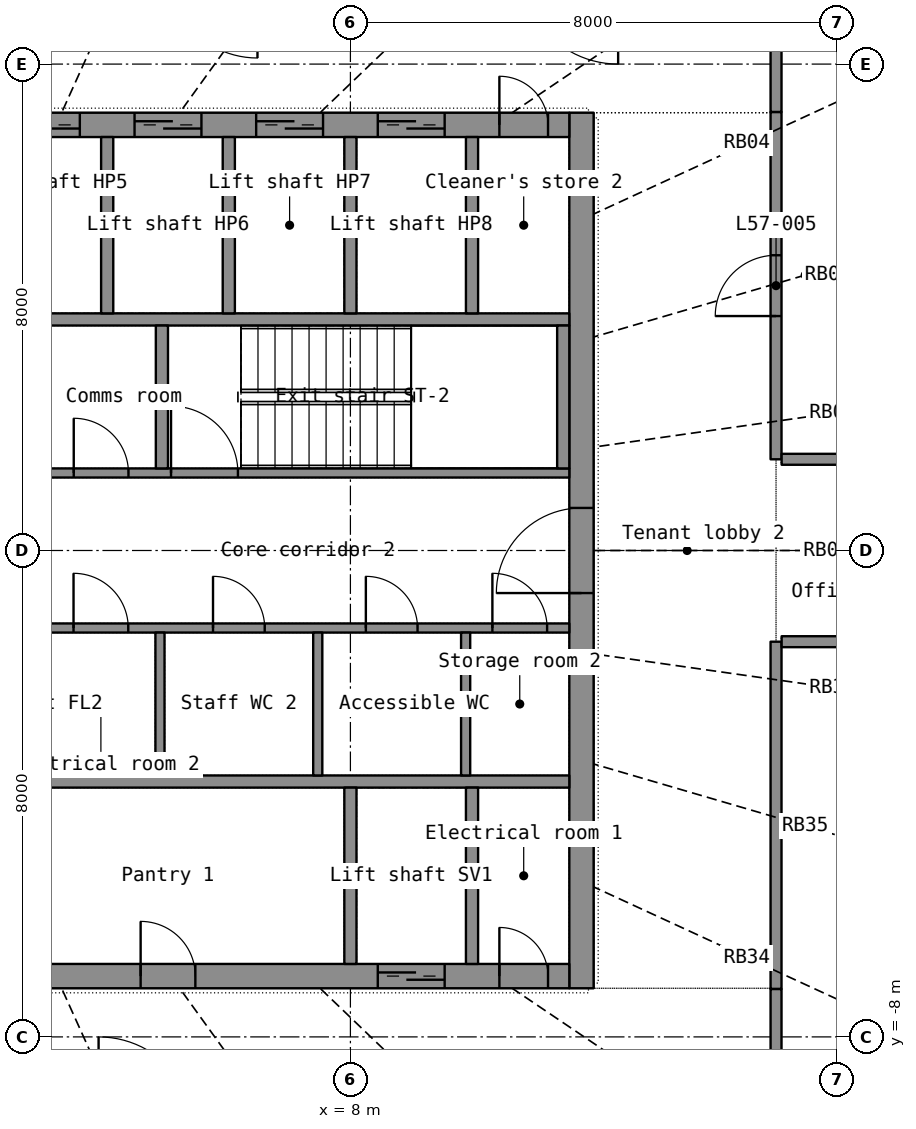
"""IFC4 building model, lengths in metres.
Left out: names, types, materials, properties, quantities, classifications, styles, units other than length and angle.
Written with IfcOpenShell. Run it as: python <this file> out.ifc"""

import sys

from ifc_helpers import new_model, si_unit, direction, frame, frame_2d, origin, place, context, subcontext, project, spatial, rectangle, extrude, element, fill, save


model = new_model("IFC4")
c1 = context("Model", 3, precision=1e-05, world=origin(), true_north=direction((0.0, 1.0)))
c2 = subcontext(c1, "Body", "Model", "MODEL_VIEW")
j1 = project(units=[si_unit("LENGTHUNIT", "METRE"), si_unit("PLANEANGLEUNIT", "RADIAN")], contexts=[c1])
p1 = place(None, origin())
s1 = spatial("IfcSite", under=j1, at=p1, CompositionType="ELEMENT")
p2 = place(p1, origin())
s2 = spatial("IfcBuilding", under=s1, at=p2, CompositionType="ELEMENT")
p3 = place(p2, frame((0.0, 0.0, 235.6)))
s3 = spatial("IfcBuildingStorey", under=s2, at=p3, CompositionType="ELEMENT", Elevation=235.6)
p4 = place(p3, frame((11.8, -7.2, 0.0), z_axis=(0.0, 0.0, 1.0), x_axis=(0.0, 1.0, 0.0)))
e1 = element("IfcWall", 1, at=p4, inside=s3, PredefinedType="SHEAR", context=c2, shape_type="SweptSolid", body=[
    extrude(rectangle(XDim=14.4, YDim=0.4, at=frame_2d((7.2, 0.0))), origin(), (0.0, 0.0, 1.0), 3.3),
])
p5 = place(p4, frame((6.5, 0.0, 0.0)))
e2 = element("IfcOpeningElement", 2, at=p5, cuts=e1, PredefinedType="OPENING", context=c2, shape_type="SweptSolid", body=[
    extrude(rectangle(XDim=1.4, YDim=2.2, at=frame_2d((0.7, 1.1))), frame((0.0, 0.21, 0.0), z_axis=(0.0, -1.0, 0.0), x_axis=(1.0, 0.0, 0.0)), (0.0, 0.0, 1.0), 0.42),
])
p6 = place(p3, frame((-11.6, -7.0, 0.0), z_axis=(0.0, 0.0, 1.0), x_axis=(1.0, 0.0, 0.0)))
e3 = element("IfcWall", 3, at=p6, inside=s3, PredefinedType="SHEAR", context=c2, shape_type="SweptSolid", body=[
    extrude(rectangle(XDim=23.2, YDim=0.4, at=frame_2d((11.6, 0.0))), origin(), (0.0, 0.0, 1.0), 3.3),
])
p7 = place(p6, frame((20.05, 0.0, 0.0)))
e4 = element("IfcOpeningElement", 4, at=p7, cuts=e3, PredefinedType="OPENING", context=c2, shape_type="SweptSolid", body=[
    extrude(rectangle(XDim=1.1, YDim=2.2, at=frame_2d((0.55, 1.1))), frame((0.0, 0.21, 0.0), z_axis=(0.0, -1.0, 0.0), x_axis=(1.0, 0.0, 0.0)), (0.0, 0.0, 1.0), 0.42),
])
p8 = place(p6, frame((3.15, 0.0, 0.0)))
e5 = element("IfcOpeningElement", 5, at=p8, cuts=e3, PredefinedType="OPENING", context=c2, shape_type="SweptSolid", body=[
    extrude(rectangle(XDim=0.9, YDim=2.1, at=frame_2d((0.45, 1.05))), frame((0.0, 0.21, 0.0), z_axis=(0.0, -1.0, 0.0), x_axis=(1.0, 0.0, 0.0)), (0.0, 0.0, 1.0), 0.42),
])
p9 = place(p6, frame((7.15, 0.0, 0.0)))
e6 = element("IfcOpeningElement", 6, at=p9, cuts=e3, PredefinedType="OPENING", context=c2, shape_type="SweptSolid", body=[
    extrude(rectangle(XDim=0.9, YDim=2.1, at=frame_2d((0.45, 1.05))), frame((0.0, 0.21, 0.0), z_axis=(0.0, -1.0, 0.0), x_axis=(1.0, 0.0, 0.0)), (0.0, 0.0, 1.0), 0.42),
])
p10 = place(p6, frame((11.15, 0.0, 0.0)))
e7 = element("IfcOpeningElement", 7, at=p10, cuts=e3, PredefinedType="OPENING", context=c2, shape_type="SweptSolid", body=[
    extrude(rectangle(XDim=0.9, YDim=2.1, at=frame_2d((0.45, 1.05))), frame((0.0, 0.21, 0.0), z_axis=(0.0, -1.0, 0.0), x_axis=(1.0, 0.0, 0.0)), (0.0, 0.0, 1.0), 0.42),
])
p11 = place(p6, frame((16.15, 0.0, 0.0)))
e8 = element("IfcOpeningElement", 8, at=p11, cuts=e3, PredefinedType="OPENING", context=c2, shape_type="SweptSolid", body=[
    extrude(rectangle(XDim=0.9, YDim=2.1, at=frame_2d((0.45, 1.05))), frame((0.0, 0.21, 0.0), z_axis=(0.0, -1.0, 0.0), x_axis=(1.0, 0.0, 0.0)), (0.0, 0.0, 1.0), 0.42),
])
p12 = place(p6, frame((0.35, 0.0, 0.0)))
e9 = element("IfcOpeningElement", 9, at=p12, cuts=e3, PredefinedType="OPENING", context=c2, shape_type="SweptSolid", body=[
    extrude(rectangle(XDim=0.8, YDim=2.05, at=frame_2d((0.4, 1.025))), frame((0.0, 0.21, 0.0), z_axis=(0.0, -1.0, 0.0), x_axis=(1.0, 0.0, 0.0)), (0.0, 0.0, 1.0), 0.42),
])
p13 = place(p6, frame((22.05, 0.0, 0.0)))
e10 = element("IfcOpeningElement", 10, at=p13, cuts=e3, PredefinedType="OPENING", context=c2, shape_type="SweptSolid", body=[
    extrude(rectangle(XDim=0.8, YDim=2.05, at=frame_2d((0.4, 1.025))), frame((0.0, 0.21, 0.0), z_axis=(0.0, -1.0, 0.0), x_axis=(1.0, 0.0, 0.0)), (0.0, 0.0, 1.0), 0.42),
])
p14 = place(p3, frame((-11.6, 7.0, 0.0), z_axis=(0.0, 0.0, 1.0), x_axis=(1.0, 0.0, 0.0)))
e11 = element("IfcWall", 11, at=p14, inside=s3, PredefinedType="SHEAR", context=c2, shape_type="SweptSolid", body=[
    extrude(rectangle(XDim=23.2, YDim=0.4, at=frame_2d((11.6, 0.0))), origin(), (0.0, 0.0, 1.0), 3.3),
])
p15 = place(p14, frame((2.05, 0.0, 0.0)))
e12 = element("IfcOpeningElement", 12, at=p15, cuts=e11, PredefinedType="OPENING", context=c2, shape_type="SweptSolid", body=[
    extrude(rectangle(XDim=1.1, YDim=2.2, at=frame_2d((0.55, 1.1))), frame((0.0, 0.21, 0.0), z_axis=(0.0, -1.0, 0.0), x_axis=(1.0, 0.0, 0.0)), (0.0, 0.0, 1.0), 0.42),
])
p16 = place(p14, frame((6.05, 0.0, 0.0)))
e13 = element("IfcOpeningElement", 13, at=p16, cuts=e11, PredefinedType="OPENING", context=c2, shape_type="SweptSolid", body=[
    extrude(rectangle(XDim=1.1, YDim=2.2, at=frame_2d((0.55, 1.1))), frame((0.0, 0.21, 0.0), z_axis=(0.0, -1.0, 0.0), x_axis=(1.0, 0.0, 0.0)), (0.0, 0.0, 1.0), 0.42),
])
p17 = place(p14, frame((8.05, 0.0, 0.0)))
e14 = element("IfcOpeningElement", 14, at=p17, cuts=e11, PredefinedType="OPENING", context=c2, shape_type="SweptSolid", body=[
    extrude(rectangle(XDim=1.1, YDim=2.2, at=frame_2d((0.55, 1.1))), frame((0.0, 0.21, 0.0), z_axis=(0.0, -1.0, 0.0), x_axis=(1.0, 0.0, 0.0)), (0.0, 0.0, 1.0), 0.42),
])
p18 = place(p14, frame((10.05, 0.0, 0.0)))
e15 = element("IfcOpeningElement", 15, at=p18, cuts=e11, PredefinedType="OPENING", context=c2, shape_type="SweptSolid", body=[
    extrude(rectangle(XDim=1.1, YDim=2.2, at=frame_2d((0.55, 1.1))), frame((0.0, 0.21, 0.0), z_axis=(0.0, -1.0, 0.0), x_axis=(1.0, 0.0, 0.0)), (0.0, 0.0, 1.0), 0.42),
])
p19 = place(p14, frame((12.05, 0.0, 0.0)))
e16 = element("IfcOpeningElement", 16, at=p19, cuts=e11, PredefinedType="OPENING", context=c2, shape_type="SweptSolid", body=[
    extrude(rectangle(XDim=1.1, YDim=2.2, at=frame_2d((0.55, 1.1))), frame((0.0, 0.21, 0.0), z_axis=(0.0, -1.0, 0.0), x_axis=(1.0, 0.0, 0.0)), (0.0, 0.0, 1.0), 0.42),
])
p20 = place(p14, frame((14.05, 0.0, 0.0)))
e17 = element("IfcOpeningElement", 17, at=p20, cuts=e11, PredefinedType="OPENING", context=c2, shape_type="SweptSolid", body=[
    extrude(rectangle(XDim=1.1, YDim=2.2, at=frame_2d((0.55, 1.1))), frame((0.0, 0.21, 0.0), z_axis=(0.0, -1.0, 0.0), x_axis=(1.0, 0.0, 0.0)), (0.0, 0.0, 1.0), 0.42),
])
p21 = place(p14, frame((16.05, 0.0, 0.0)))
e18 = element("IfcOpeningElement", 18, at=p21, cuts=e11, PredefinedType="OPENING", context=c2, shape_type="SweptSolid", body=[
    extrude(rectangle(XDim=1.1, YDim=2.2, at=frame_2d((0.55, 1.1))), frame((0.0, 0.21, 0.0), z_axis=(0.0, -1.0, 0.0), x_axis=(1.0, 0.0, 0.0)), (0.0, 0.0, 1.0), 0.42),
])
p22 = place(p14, frame((18.05, 0.0, 0.0)))
e19 = element("IfcOpeningElement", 19, at=p22, cuts=e11, PredefinedType="OPENING", context=c2, shape_type="SweptSolid", body=[
    extrude(rectangle(XDim=1.1, YDim=2.2, at=frame_2d((0.55, 1.1))), frame((0.0, 0.21, 0.0), z_axis=(0.0, -1.0, 0.0), x_axis=(1.0, 0.0, 0.0)), (0.0, 0.0, 1.0), 0.42),
])
p23 = place(p14, frame((20.05, 0.0, 0.0)))
e20 = element("IfcOpeningElement", 20, at=p23, cuts=e11, PredefinedType="OPENING", context=c2, shape_type="SweptSolid", body=[
    extrude(rectangle(XDim=1.1, YDim=2.2, at=frame_2d((0.55, 1.1))), frame((0.0, 0.21, 0.0), z_axis=(0.0, -1.0, 0.0), x_axis=(1.0, 0.0, 0.0)), (0.0, 0.0, 1.0), 0.42),
])
p24 = place(p14, frame((4.15, 0.0, 0.0)))
e21 = element("IfcOpeningElement", 21, at=p24, cuts=e11, PredefinedType="OPENING", context=c2, shape_type="SweptSolid", body=[
    extrude(rectangle(XDim=0.9, YDim=2.1, at=frame_2d((0.45, 1.05))), frame((0.0, 0.21, 0.0), z_axis=(0.0, -1.0, 0.0), x_axis=(1.0, 0.0, 0.0)), (0.0, 0.0, 1.0), 0.42),
])
p25 = place(p14, frame((0.35, 0.0, 0.0)))
e22 = element("IfcOpeningElement", 22, at=p25, cuts=e11, PredefinedType="OPENING", context=c2, shape_type="SweptSolid", body=[
    extrude(rectangle(XDim=0.8, YDim=2.05, at=frame_2d((0.4, 1.025))), frame((0.0, 0.21, 0.0), z_axis=(0.0, -1.0, 0.0), x_axis=(1.0, 0.0, 0.0)), (0.0, 0.0, 1.0), 0.42),
])
p26 = place(p14, frame((22.05, 0.0, 0.0)))
e23 = element("IfcOpeningElement", 23, at=p26, cuts=e11, PredefinedType="OPENING", context=c2, shape_type="SweptSolid", body=[
    extrude(rectangle(XDim=0.8, YDim=2.05, at=frame_2d((0.4, 1.025))), frame((0.0, 0.21, 0.0), z_axis=(0.0, -1.0, 0.0), x_axis=(1.0, 0.0, 0.0)), (0.0, 0.0, 1.0), 0.42),
])
for number, where, z_axis, x_axis in (
    (24, (-11.6, -3.8, 0.0), (0.0, 0.0, 1.0), (1.0, 0.0, 0.0)),
    (25, (-11.6, 3.8, 0.0), (0.0, 0.0, 1.0), (1.0, 0.0, 0.0)),
):
    element("IfcWall", number, at=place(p3, frame(where, z_axis=z_axis, x_axis=x_axis)), inside=s3, PredefinedType="SHEAR", context=c2, shape_type="SweptSolid", body=[
        extrude(rectangle(XDim=23.2, YDim=0.2, at=frame_2d((11.6, 0.0))), origin(), (0.0, 0.0, 1.0), 3.3),
    ])
for number, where, z_axis, x_axis in (
    (26, (8.0, -6.8, 0.0), (0.0, 0.0, 1.0), (0.0, 1.0, 0.0)),
    (27, (10.0, -6.8, 0.0), (0.0, 0.0, 1.0), (0.0, 1.0, 0.0)),
    (28, (4.0, 3.9, 0.0), (0.0, 0.0, 1.0), (0.0, 1.0, 0.0)),
    (29, (6.0, 3.9, 0.0), (0.0, 0.0, 1.0), (0.0, 1.0, 0.0)),
    (30, (8.0, 3.9, 0.0), (0.0, 0.0, 1.0), (0.0, 1.0, 0.0)),
    (31, (10.0, 3.9, 0.0), (0.0, 0.0, 1.0), (0.0, 1.0, 0.0)),
):
    element("IfcWall", number, at=place(p3, frame(where, z_axis=z_axis, x_axis=x_axis)), inside=s3, PredefinedType="SHEAR", context=c2, shape_type="SweptSolid", body=[
        extrude(rectangle(XDim=2.9, YDim=0.2, at=frame_2d((1.45, 0.0))), origin(), (0.0, 0.0, 1.0), 3.3),
    ])
p27 = place(p3, frame((3.0, -1.275, 0.0), z_axis=(0.0, 0.0, 1.0), x_axis=(1.0, 0.0, 0.0)))
e32 = element("IfcWall", 32, at=p27, inside=s3, PredefinedType="PARTITIONING", context=c2, shape_type="SweptSolid", body=[
    extrude(rectangle(XDim=8.6, YDim=0.15, at=frame_2d((4.3, 0.0))), origin(), (0.0, 0.0, 1.0), 3.3),
])
p28 = place(p27, frame((0.447, 0.0, 0.0)))
e33 = element("IfcOpeningElement", 33, at=p28, cuts=e32, PredefinedType="OPENING", context=c2, shape_type="SweptSolid", body=[
    extrude(rectangle(XDim=0.9, YDim=2.1, at=frame_2d((0.45, 1.05))), frame((0.0, 0.085, 0.0), z_axis=(0.0, -1.0, 0.0), x_axis=(1.0, 0.0, 0.0)), (0.0, 0.0, 1.0), 0.17),
])
p29 = place(p27, frame((2.74, 0.0, 0.0)))
e34 = element("IfcOpeningElement", 34, at=p29, cuts=e32, PredefinedType="OPENING", context=c2, shape_type="SweptSolid", body=[
    extrude(rectangle(XDim=0.85, YDim=2.1, at=frame_2d((0.425, 1.05))), frame((0.0, 0.085, 0.0), z_axis=(0.0, -1.0, 0.0), x_axis=(1.0, 0.0, 0.0)), (0.0, 0.0, 1.0), 0.17),
])
p30 = place(p27, frame((5.254, 0.0, 0.0)))
e35 = element("IfcOpeningElement", 35, at=p30, cuts=e32, PredefinedType="OPENING", context=c2, shape_type="SweptSolid", body=[
    extrude(rectangle(XDim=0.85, YDim=2.1, at=frame_2d((0.425, 1.05))), frame((0.0, 0.085, 0.0), z_axis=(0.0, -1.0, 0.0), x_axis=(1.0, 0.0, 0.0)), (0.0, 0.0, 1.0), 0.17),
])
p31 = place(p27, frame((7.335, 0.0, 0.0)))
e36 = element("IfcOpeningElement", 36, at=p31, cuts=e32, PredefinedType="OPENING", context=c2, shape_type="SweptSolid", body=[
    extrude(rectangle(XDim=0.9, YDim=2.1, at=frame_2d((0.45, 1.05))), frame((0.0, 0.085, 0.0), z_axis=(0.0, -1.0, 0.0), x_axis=(1.0, 0.0, 0.0)), (0.0, 0.0, 1.0), 0.17),
])
p32 = place(p3, frame((3.0, 1.275, 0.0), z_axis=(0.0, 0.0, 1.0), x_axis=(1.0, 0.0, 0.0)))
e37 = element("IfcWall", 37, at=p32, inside=s3, PredefinedType="SHEAR", context=c2, shape_type="SweptSolid", body=[
    extrude(rectangle(XDim=8.6, YDim=0.15, at=frame_2d((4.3, 0.0))), origin(), (0.0, 0.0, 1.0), 3.3),
])
p33 = place(p32, frame((2.05, 0.0, 0.0)))
e38 = element("IfcOpeningElement", 38, at=p33, cuts=e37, PredefinedType="OPENING", context=c2, shape_type="SweptSolid", body=[
    extrude(rectangle(XDim=1.1, YDim=2.15, at=frame_2d((0.55, 1.075))), frame((0.0, 0.085, 0.0), z_axis=(0.0, -1.0, 0.0), x_axis=(1.0, 0.0, 0.0)), (0.0, 0.0, 1.0), 0.17),
])
p34 = place(p32, frame((0.45, 0.0, 0.0)))
e39 = element("IfcOpeningElement", 39, at=p34, cuts=e37, PredefinedType="OPENING", context=c2, shape_type="SweptSolid", body=[
    extrude(rectangle(XDim=0.9, YDim=2.1, at=frame_2d((0.45, 1.05))), frame((0.0, 0.085, 0.0), z_axis=(0.0, -1.0, 0.0), x_axis=(1.0, 0.0, 0.0)), (0.0, 0.0, 1.0), 0.17),
])
for number, where, z_axis, x_axis in (
    (40, (11.5, 1.35, 0.0), (0.0, 0.0, 1.0), (0.0, 1.0, 0.0)),
    (41, (4.9, 1.35, 0.0), (0.0, 0.0, 1.0), (0.0, 1.0, 0.0)),
):
    element("IfcWall", number, at=place(p3, frame(where, z_axis=z_axis, x_axis=x_axis)), inside=s3, PredefinedType="SHEAR", context=c2, shape_type="SweptSolid", body=[
        extrude(rectangle(XDim=2.35, YDim=0.2, at=frame_2d((1.175, 0.0))), origin(), (0.0, 0.0, 1.0), 3.3),
    ])
for number, where, z_axis, x_axis in (
    (42, (4.868, -3.7, 0.0), (0.0, 0.0, 1.0), (0.0, 1.0, 0.0)),
    (43, (7.463, -3.7, 0.0), (0.0, 0.0, 1.0), (0.0, 1.0, 0.0)),
    (44, (9.895, -3.7, 0.0), (0.0, 0.0, 1.0), (0.0, 1.0, 0.0)),
):
    element("IfcWall", number, at=place(p3, frame(where, z_axis=z_axis, x_axis=x_axis)), inside=s3, PredefinedType="PARTITIONING", context=c2, shape_type="SweptSolid", body=[
        extrude(rectangle(XDim=2.35, YDim=0.15, at=frame_2d((1.175, 0.0))), origin(), (0.0, 0.0, 1.0), 3.3),
    ])
p35 = place(p3, frame((15.0, -7.212, 0.0), z_axis=(0.0, 0.0, 1.0), x_axis=(0.0, 1.0, 0.0)))
e45 = element("IfcWall", 45, at=p35, inside=s3, PredefinedType="PARTITIONING", context=c2, shape_type="SweptSolid", body=[
    extrude(rectangle(XDim=5.712, YDim=0.18, at=frame_2d((2.856, 0.0))), origin(), (0.0, 0.0, 1.0), 2.4),
])
p36 = place(p3, frame((15.0, 1.5, 0.0), z_axis=(0.0, 0.0, 1.0), x_axis=(0.0, 1.0, 0.0)))
e46 = element("IfcWall", 46, at=p36, inside=s3, PredefinedType="PARTITIONING", context=c2, shape_type="SweptSolid", body=[
    extrude(rectangle(XDim=5.712, YDim=0.18, at=frame_2d((2.856, 0.0))), origin(), (0.0, 0.0, 1.0), 2.4),
])
p37 = place(p36, frame((2.356, 0.0, 0.0)))
e47 = element("IfcOpeningElement", 47, at=p37, cuts=e46, PredefinedType="OPENING", context=c2, shape_type="SweptSolid", body=[
    extrude(rectangle(XDim=1.0, YDim=2.1, at=frame_2d((0.5, 1.05))), frame((0.0, 0.1, 0.0), z_axis=(0.0, -1.0, 0.0), x_axis=(1.0, 0.0, 0.0)), (0.0, 0.0, 1.0), 0.2),
])
for number, where, z_axis, x_axis in (
    (48, (15.092, -1.5, 0.0), (0.0, 0.0, 1.0), (1.0, 0.0, 0.0)),
    (49, (18.722, 1.5, 0.0), (0.0, 0.0, 1.0), (-1.0, 0.0, 0.0)),
):
    element("IfcWall", number, at=place(p3, frame(where, z_axis=z_axis, x_axis=x_axis)), inside=s3, PredefinedType="PARTITIONING", context=c2, shape_type="SweptSolid", body=[
        extrude(rectangle(XDim=3.63, YDim=0.18, at=frame_2d((1.815, 0.0))), origin(), (0.0, 0.0, 1.0), 2.4),
    ])
p38 = place(p3, frame((15.0, -9.508, 0.0), z_axis=(0.0, 0.0, 1.0), x_axis=(0.0, 1.0, 0.0)))
e50 = element("IfcWall", 50, at=p38, inside=s3, PredefinedType="PARTITIONING", context=c2, shape_type="SweptSolid", body=[
    extrude(rectangle(XDim=2.295, YDim=0.18, at=frame_2d((1.147, 0.0))), origin(), (0.0, 0.0, 1.0), 2.4),
])
p39 = place(p3, frame((15.0, 7.213, 0.0), z_axis=(0.0, 0.0, 1.0), x_axis=(0.0, 1.0, 0.0)))
e51 = element("IfcWall", 51, at=p39, inside=s3, PredefinedType="PARTITIONING", context=c2, shape_type="SweptSolid", body=[
    extrude(rectangle(XDim=1.31, YDim=0.18, at=frame_2d((0.655, 0.0))), origin(), (0.0, 0.0, 1.0), 2.4),
])
p40 = place(p7, origin())
e52 = element("IfcDoor", 52, at=p40, inside=s3, OperationType="DOUBLE_DOOR_SLIDING", PredefinedType="DOOR", context=c2, shape_type="SweptSolid", body=[
    extrude(rectangle(XDim=1.1, YDim=2.2, at=frame_2d((0.55, 1.1))), frame((0.0, 0.025, 0.0), z_axis=(0.0, -1.0, 0.0), x_axis=(1.0, 0.0, 0.0)), (0.0, 0.0, 1.0), 0.05),
])
fill(e4, e52)
p41 = place(p11, origin())
e53 = element("IfcDoor", 53, at=p41, inside=s3, OperationType="SINGLE_SWING_LEFT", PredefinedType="DOOR", context=c2, shape_type="SweptSolid", body=[
    extrude(rectangle(XDim=0.9, YDim=2.1, at=frame_2d((0.45, 1.05))), frame((0.0, 0.025, 0.0), z_axis=(0.0, -1.0, 0.0), x_axis=(1.0, 0.0, 0.0)), (0.0, 0.0, 1.0), 0.05),
])
fill(e8, e53)
p42 = place(p13, origin())
e54 = element("IfcDoor", 54, at=p42, inside=s3, OperationType="SINGLE_SWING_LEFT", PredefinedType="DOOR", context=c2, shape_type="SweptSolid", body=[
    extrude(rectangle(XDim=0.8, YDim=2.05, at=frame_2d((0.4, 1.025))), frame((0.0, 0.025, 0.0), z_axis=(0.0, -1.0, 0.0), x_axis=(1.0, 0.0, 0.0)), (0.0, 0.0, 1.0), 0.05),
])
fill(e10, e54)
p43 = place(p20, origin())
e55 = element("IfcDoor", 55, at=p43, inside=s3, OperationType="DOUBLE_DOOR_SLIDING", PredefinedType="DOOR", context=c2, shape_type="SweptSolid", body=[
    extrude(rectangle(XDim=1.1, YDim=2.2, at=frame_2d((0.55, 1.1))), frame((0.0, 0.025, 0.0), z_axis=(0.0, -1.0, 0.0), x_axis=(1.0, 0.0, 0.0)), (0.0, 0.0, 1.0), 0.05),
])
fill(e17, e55)
p44 = place(p21, origin())
e56 = element("IfcDoor", 56, at=p44, inside=s3, OperationType="DOUBLE_DOOR_SLIDING", PredefinedType="DOOR", context=c2, shape_type="SweptSolid", body=[
    extrude(rectangle(XDim=1.1, YDim=2.2, at=frame_2d((0.55, 1.1))), frame((0.0, 0.025, 0.0), z_axis=(0.0, -1.0, 0.0), x_axis=(1.0, 0.0, 0.0)), (0.0, 0.0, 1.0), 0.05),
])
fill(e18, e56)
p45 = place(p22, origin())
e57 = element("IfcDoor", 57, at=p45, inside=s3, OperationType="DOUBLE_DOOR_SLIDING", PredefinedType="DOOR", context=c2, shape_type="SweptSolid", body=[
    extrude(rectangle(XDim=1.1, YDim=2.2, at=frame_2d((0.55, 1.1))), frame((0.0, 0.025, 0.0), z_axis=(0.0, -1.0, 0.0), x_axis=(1.0, 0.0, 0.0)), (0.0, 0.0, 1.0), 0.05),
])
fill(e19, e57)
p46 = place(p23, origin())
e58 = element("IfcDoor", 58, at=p46, inside=s3, OperationType="DOUBLE_DOOR_SLIDING", PredefinedType="DOOR", context=c2, shape_type="SweptSolid", body=[
    extrude(rectangle(XDim=1.1, YDim=2.2, at=frame_2d((0.55, 1.1))), frame((0.0, 0.025, 0.0), z_axis=(0.0, -1.0, 0.0), x_axis=(1.0, 0.0, 0.0)), (0.0, 0.0, 1.0), 0.05),
])
fill(e20, e58)
p47 = place(p26, origin())
e59 = element("IfcDoor", 59, at=p47, inside=s3, OperationType="SINGLE_SWING_LEFT", PredefinedType="DOOR", context=c2, shape_type="SweptSolid", body=[
    extrude(rectangle(XDim=0.8, YDim=2.05, at=frame_2d((0.4, 1.025))), frame((0.0, 0.025, 0.0), z_axis=(0.0, -1.0, 0.0), x_axis=(1.0, 0.0, 0.0)), (0.0, 0.0, 1.0), 0.05),
])
fill(e23, e59)
p48 = place(p5, origin())
e60 = element("IfcDoor", 60, at=p48, inside=s3, OperationType="DOUBLE_DOOR_SINGLE_SWING", PredefinedType="DOOR", context=c2, shape_type="SweptSolid", body=[
    extrude(rectangle(XDim=1.4, YDim=2.2, at=frame_2d((0.7, 1.1))), frame((0.0, 0.025, 0.0), z_axis=(0.0, -1.0, 0.0), x_axis=(1.0, 0.0, 0.0)), (0.0, 0.0, 1.0), 0.05),
])
fill(e2, e60)
p49 = place(p33, origin())
e61 = element("IfcDoor", 61, at=p49, inside=s3, OperationType="SINGLE_SWING_LEFT", PredefinedType="DOOR", context=c2, shape_type="SweptSolid", body=[
    extrude(rectangle(XDim=1.1, YDim=2.15, at=frame_2d((0.55, 1.075))), frame((0.0, 0.025, 0.0), z_axis=(0.0, -1.0, 0.0), x_axis=(1.0, 0.0, 0.0)), (0.0, 0.0, 1.0), 0.05),
])
fill(e38, e61)
p50 = place(p28, origin())
e62 = element("IfcDoor", 62, at=p50, inside=s3, OperationType="SINGLE_SWING_LEFT", PredefinedType="DOOR", context=c2, shape_type="SweptSolid", body=[
    extrude(rectangle(XDim=0.9, YDim=2.1, at=frame_2d((0.45, 1.05))), frame((0.0, 0.025, 0.0), z_axis=(0.0, -1.0, 0.0), x_axis=(1.0, 0.0, 0.0)), (0.0, 0.0, 1.0), 0.05),
])
fill(e33, e62)
p51 = place(p29, origin())
e63 = element("IfcDoor", 63, at=p51, inside=s3, OperationType="SINGLE_SWING_LEFT", PredefinedType="DOOR", context=c2, shape_type="SweptSolid", body=[
    extrude(rectangle(XDim=0.85, YDim=2.1, at=frame_2d((0.425, 1.05))), frame((0.0, 0.025, 0.0), z_axis=(0.0, -1.0, 0.0), x_axis=(1.0, 0.0, 0.0)), (0.0, 0.0, 1.0), 0.05),
])
fill(e34, e63)
p52 = place(p30, origin())
e64 = element("IfcDoor", 64, at=p52, inside=s3, OperationType="SINGLE_SWING_LEFT", PredefinedType="DOOR", context=c2, shape_type="SweptSolid", body=[
    extrude(rectangle(XDim=0.85, YDim=2.1, at=frame_2d((0.425, 1.05))), frame((0.0, 0.025, 0.0), z_axis=(0.0, -1.0, 0.0), x_axis=(1.0, 0.0, 0.0)), (0.0, 0.0, 1.0), 0.05),
])
fill(e35, e64)
p53 = place(p31, origin())
e65 = element("IfcDoor", 65, at=p53, inside=s3, OperationType="SINGLE_SWING_LEFT", PredefinedType="DOOR", context=c2, shape_type="SweptSolid", body=[
    extrude(rectangle(XDim=0.9, YDim=2.1, at=frame_2d((0.45, 1.05))), frame((0.0, 0.025, 0.0), z_axis=(0.0, -1.0, 0.0), x_axis=(1.0, 0.0, 0.0)), (0.0, 0.0, 1.0), 0.05),
])
fill(e36, e65)
p54 = place(p34, origin())
e66 = element("IfcDoor", 66, at=p54, inside=s3, OperationType="SINGLE_SWING_LEFT", PredefinedType="DOOR", context=c2, shape_type="SweptSolid", body=[
    extrude(rectangle(XDim=0.9, YDim=2.1, at=frame_2d((0.45, 1.05))), frame((0.0, 0.025, 0.0), z_axis=(0.0, -1.0, 0.0), x_axis=(1.0, 0.0, 0.0)), (0.0, 0.0, 1.0), 0.05),
])
fill(e39, e66)
p55 = place(p37, origin())
e67 = element("IfcDoor", 67, at=p55, inside=s3, OperationType="SINGLE_SWING_LEFT", PredefinedType="DOOR", context=c2, shape_type="SweptSolid", body=[
    extrude(rectangle(XDim=1.0, YDim=2.1, at=frame_2d((0.5, 1.05))), frame((0.0, 0.025, 0.0), z_axis=(0.0, -1.0, 0.0), x_axis=(1.0, 0.0, 0.0)), (0.0, 0.0, 1.0), 0.05),
])
fill(e47, e67)
save(model, sys.argv[1])
